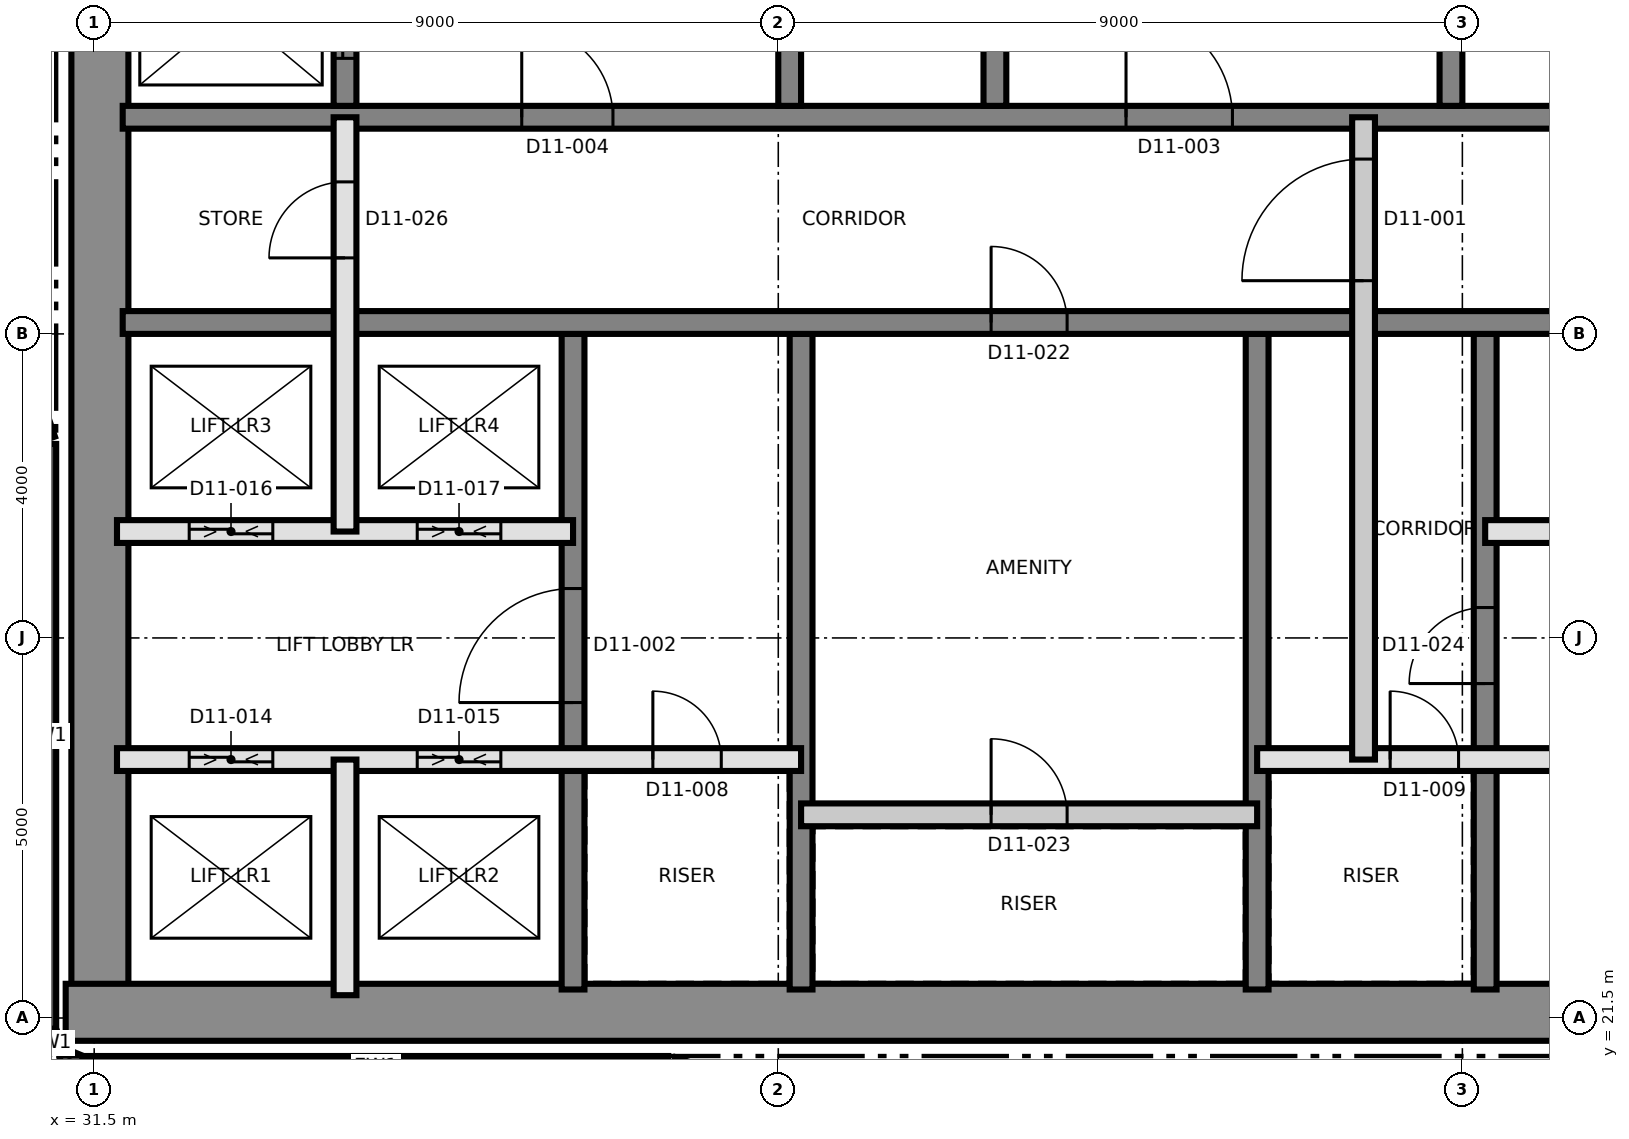
"""IFC4 building model, lengths in metres.
Left out: names, types, materials, properties, quantities, classifications, styles, units other than length and angle.
Written with IfcOpenShell. Run it as: python <this file> out.ifc"""

import sys

from ifc_helpers import new_model, si_unit, direction, frame, frame_2d, origin, place, context, subcontext, project, spatial, rectangle, extrude, element, fill, save


model = new_model("IFC4")
c1 = context("Model", 3, precision=1e-05, world=origin(), true_north=direction((0.0, 1.0)))
c2 = subcontext(c1, "Body", "Model", "MODEL_VIEW")
j1 = project(units=[si_unit("LENGTHUNIT", "METRE"), si_unit("PLANEANGLEUNIT", "RADIAN")], contexts=[c1])
p1 = place(None, origin())
s1 = spatial("IfcSite", under=j1, at=p1, CompositionType="ELEMENT")
p2 = place(p1, origin())
s2 = spatial("IfcBuilding", under=s1, at=p2, CompositionType="ELEMENT")
p3 = place(p2, frame((0.0, 0.0, 131.5)))
s3 = spatial("IfcBuildingStorey", under=s2, at=p3, CompositionType="ELEMENT", Elevation=131.5)
p4 = place(p3, frame((31.575, 21.875, 0.0), z_axis=(0.0, 0.0, 1.0), x_axis=(0.0, 1.0, 0.0)))
e1 = element("IfcWall", 1, at=p4, inside=s3, PredefinedType="SHEAR", context=c2, shape_type="SweptSolid", body=[
    extrude(rectangle(XDim=17.25, YDim=0.75, at=frame_2d((8.625, 0.0))), origin(), (0.0, 0.0, 1.0), 3.7),
])
p5 = place(p3, frame((31.125, 21.575, 0.0), z_axis=(0.0, 0.0, 1.0), x_axis=(1.0, 0.0, 0.0)))
e2 = element("IfcWall", 2, at=p5, inside=s3, PredefinedType="SHEAR", context=c2, shape_type="SweptSolid", body=[
    extrude(rectangle(XDim=27.0, YDim=0.75, at=frame_2d((13.5, 0.0))), origin(), (0.0, 0.0, 1.0), 3.7),
])
p6 = place(p3, frame((37.8, 21.875, 0.0), z_axis=(0.0, 0.0, 1.0), x_axis=(0.0, 1.0, 0.0)))
e3 = element("IfcWall", 3, at=p6, inside=s3, PredefinedType="SHEAR", context=c2, shape_type="SweptSolid", body=[
    extrude(rectangle(XDim=8.625, YDim=0.3, at=frame_2d((4.312, 0.0))), origin(), (0.0, 0.0, 1.0), 3.7),
])
p7 = place(p6, frame((3.775, 0.0, 0.0)))
e4 = element("IfcOpeningElement", 4, at=p7, cuts=e3, PredefinedType="OPENING", context=c2, shape_type="SweptSolid", body=[
    extrude(rectangle(XDim=1.5, YDim=2.1, at=frame_2d((0.75, 1.05))), frame((0.0, 0.16, 0.0), z_axis=(0.0, -1.0, 0.0), x_axis=(1.0, 0.0, 0.0)), (0.0, 0.0, 1.0), 0.32),
])
for number, where, z_axis, x_axis in (
    (5, (40.8, 21.875, 0.0), (0.0, 0.0, 1.0), (0.0, 1.0, 0.0)),
    (6, (46.8, 21.875, 0.0), (0.0, 0.0, 1.0), (0.0, 1.0, 0.0)),
):
    element("IfcWall", number, at=place(p3, frame(where, z_axis=z_axis, x_axis=x_axis)), inside=s3, PredefinedType="SHEAR", context=c2, shape_type="SweptSolid", body=[
        extrude(rectangle(XDim=8.625, YDim=0.3, at=frame_2d((4.312, 0.0))), origin(), (0.0, 0.0, 1.0), 3.7),
    ])
p8 = place(p3, frame((49.8, 21.875, 0.0), z_axis=(0.0, 0.0, 1.0), x_axis=(0.0, 1.0, 0.0)))
e7 = element("IfcWall", 7, at=p8, inside=s3, PredefinedType="SHEAR", context=c2, shape_type="SweptSolid", body=[
    extrude(rectangle(XDim=8.625, YDim=0.3, at=frame_2d((4.312, 0.0))), origin(), (0.0, 0.0, 1.0), 3.7),
])
p9 = place(p8, frame((4.025, 0.0, 0.0)))
e8 = element("IfcOpeningElement", 8, at=p9, cuts=e7, PredefinedType="OPENING", context=c2, shape_type="SweptSolid", body=[
    extrude(rectangle(XDim=1.0, YDim=2.1, at=frame_2d((0.5, 1.05))), frame((0.0, 0.16, 0.0), z_axis=(0.0, -1.0, 0.0), x_axis=(1.0, 0.0, 0.0)), (0.0, 0.0, 1.0), 0.32),
])
p10 = place(p3, frame((31.875, 30.65, 0.0), z_axis=(0.0, 0.0, 1.0), x_axis=(1.0, 0.0, 0.0)))
e9 = element("IfcWall", 9, at=p10, inside=s3, PredefinedType="SHEAR", context=c2, shape_type="SweptSolid", body=[
    extrude(rectangle(XDim=26.25, YDim=0.3, at=frame_2d((13.125, 0.0))), origin(), (0.0, 0.0, 1.0), 3.7),
])
p11 = place(p10, frame((24.625, 0.0, 0.0)))
e10 = element("IfcOpeningElement", 10, at=p11, cuts=e9, PredefinedType="OPENING", context=c2, shape_type="SweptSolid", body=[
    extrude(rectangle(XDim=1.0, YDim=2.1, at=frame_2d((0.5, 1.05))), frame((0.0, 0.16, 0.0), z_axis=(0.0, -1.0, 0.0), x_axis=(1.0, 0.0, 0.0)), (0.0, 0.0, 1.0), 0.32),
])
p12 = place(p10, frame((11.425, 0.0, 0.0)))
e11 = element("IfcOpeningElement", 11, at=p12, cuts=e9, PredefinedType="OPENING", context=c2, shape_type="SweptSolid", body=[
    extrude(rectangle(XDim=1.0, YDim=2.1, at=frame_2d((0.5, 1.05))), frame((0.0, 0.16, 0.0), z_axis=(0.0, -1.0, 0.0), x_axis=(1.0, 0.0, 0.0)), (0.0, 0.0, 1.0), 0.32),
])
p13 = place(p3, frame((31.875, 33.35, 0.0), z_axis=(0.0, 0.0, 1.0), x_axis=(1.0, 0.0, 0.0)))
e12 = element("IfcWall", 12, at=p13, inside=s3, PredefinedType="SHEAR", context=c2, shape_type="SweptSolid", body=[
    extrude(rectangle(XDim=26.25, YDim=0.3, at=frame_2d((13.125, 0.0))), origin(), (0.0, 0.0, 1.0), 3.7),
])
p14 = place(p13, frame((13.2, 0.0, 0.0)))
e13 = element("IfcOpeningElement", 13, at=p14, cuts=e12, PredefinedType="OPENING", context=c2, shape_type="SweptSolid", body=[
    extrude(rectangle(XDim=1.4, YDim=2.1, at=frame_2d((0.7, 1.05))), frame((0.0, 0.16, 0.0), z_axis=(0.0, -1.0, 0.0), x_axis=(1.0, 0.0, 0.0)), (0.0, 0.0, 1.0), 0.32),
])
p15 = place(p13, frame((5.25, 0.0, 0.0)))
e14 = element("IfcOpeningElement", 14, at=p15, cuts=e12, PredefinedType="OPENING", context=c2, shape_type="SweptSolid", body=[
    extrude(rectangle(XDim=1.2, YDim=2.1, at=frame_2d((0.6, 1.05))), frame((0.0, 0.16, 0.0), z_axis=(0.0, -1.0, 0.0), x_axis=(1.0, 0.0, 0.0)), (0.0, 0.0, 1.0), 0.32),
])
p16 = place(p13, frame((19.8, 0.0, 0.0)))
e15 = element("IfcOpeningElement", 15, at=p16, cuts=e12, PredefinedType="OPENING", context=c2, shape_type="SweptSolid", body=[
    extrude(rectangle(XDim=1.2, YDim=2.1, at=frame_2d((0.6, 1.05))), frame((0.0, 0.16, 0.0), z_axis=(0.0, -1.0, 0.0), x_axis=(1.0, 0.0, 0.0)), (0.0, 0.0, 1.0), 0.32),
])
for number, where, z_axis, x_axis in (
    (16, (40.65, 33.5, 0.0), (0.0, 0.0, 1.0), (0.0, 1.0, 0.0)),
    (17, (43.35, 33.5, 0.0), (0.0, 0.0, 1.0), (0.0, 1.0, 0.0)),
):
    element("IfcWall", number, at=place(p3, frame(where, z_axis=z_axis, x_axis=x_axis)), inside=s3, PredefinedType="SHEAR", context=c2, shape_type="SweptSolid", body=[
        extrude(rectangle(XDim=5.625, YDim=0.3, at=frame_2d((2.812, 0.0))), origin(), (0.0, 0.0, 1.0), 3.7),
    ])
p17 = place(p3, frame((34.8, 33.5, 0.0), z_axis=(0.0, 0.0, 1.0), x_axis=(0.0, 1.0, 0.0)))
e18 = element("IfcWall", 18, at=p17, inside=s3, PredefinedType="SHEAR", context=c2, shape_type="SweptSolid", body=[
    extrude(rectangle(XDim=2.55, YDim=0.3, at=frame_2d((1.275, 0.0))), origin(), (0.0, 0.0, 1.0), 3.7),
])
p18 = place(p17, frame((0.625, 0.0, 0.0)))
e19 = element("IfcOpeningElement", 19, at=p18, cuts=e18, PredefinedType="OPENING", context=c2, shape_type="SweptSolid", body=[
    extrude(rectangle(XDim=1.3, YDim=2.4, at=frame_2d((0.65, 1.2))), frame((0.0, 0.16, 0.0), z_axis=(0.0, -1.0, 0.0), x_axis=(1.0, 0.0, 0.0)), (0.0, 0.0, 1.0), 0.32),
])
p19 = place(p3, frame((49.35, 33.5, 0.0), z_axis=(0.0, 0.0, 1.0), x_axis=(0.0, 1.0, 0.0)))
e20 = element("IfcWall", 20, at=p19, inside=s3, PredefinedType="SHEAR", context=c2, shape_type="SweptSolid", body=[
    extrude(rectangle(XDim=5.625, YDim=0.3, at=frame_2d((2.812, 0.0))), origin(), (0.0, 0.0, 1.0), 3.7),
])
p20 = place(p3, frame((30.85, 29.052, 0.0), z_axis=(0.0, 0.0, 1.0), x_axis=(0.0, -1.0, 0.0)))
e21 = element("IfcWall", 21, at=p20, inside=s3, PredefinedType="SOLIDWALL", context=c2, shape_type="SweptSolid", body=[
    extrude(rectangle(XDim=7.693, YDim=0.3, at=frame_2d((3.846, 0.0))), origin(), (0.0, 0.0, 1.0), 3.4),
])
for number, where, z_axis, x_axis in (
    (22, (30.861, 21.302, 0.0), (0.0, 0.0, 1.0), (0.383, -0.924, 0.0)),
    (23, (31.048, 20.967, 0.0), (0.0, 0.0, 1.0), (0.924, -0.383, 0.0)),
):
    element("IfcWall", number, at=place(p3, frame(where, z_axis=z_axis, x_axis=x_axis)), inside=s3, PredefinedType="SOLIDWALL", context=c2, shape_type="SweptSolid", body=[
        extrude(rectangle(XDim=0.275, YDim=0.3, at=frame_2d((0.138, 0.0))), origin(), (0.0, 0.0, 1.0), 3.4),
    ])
p21 = place(p3, frame((31.36, 20.85, 0.0), z_axis=(0.0, 0.0, 1.0), x_axis=(1.0, 0.0, 0.0)))
e24 = element("IfcWall", 24, at=p21, inside=s3, PredefinedType="SOLIDWALL", context=c2, shape_type="SweptSolid", body=[
    extrude(rectangle(XDim=7.693, YDim=0.3, at=frame_2d((3.846, 0.0))), origin(), (0.0, 0.0, 1.0), 3.4),
])
for number, where, z_axis, x_axis in (
    (25, (39.101, 20.842, 0.0), (0.0, 0.0, 1.0), (0.947, -0.321, 0.0)),
    (26, (30.418, 30.351, 0.0), (0.0, 0.0, 1.0), (0.321, -0.947, 0.0)),
):
    element("IfcWall", number, at=place(p3, frame(where, z_axis=z_axis, x_axis=x_axis)), inside=s3, PredefinedType="SOLIDWALL", context=c2, shape_type="SweptSolid", body=[
        extrude(rectangle(XDim=1.32, YDim=0.3, at=frame_2d((0.66, 0.0))), origin(), (0.0, 0.0, 1.0), 3.4),
    ])
p22 = place(p3, frame((40.8, 24.173, 0.0), z_axis=(0.0, 0.0, 1.0), x_axis=(1.0, 0.0, 0.0)))
e27 = element("IfcWall", 27, at=p22, inside=s3, PredefinedType="PARTITIONING", context=c2, shape_type="SweptSolid", body=[
    extrude(rectangle(XDim=6.0, YDim=0.3, at=frame_2d((3.0, 0.0))), origin(), (0.0, 0.0, 1.0), 3.4),
])
p23 = place(p22, frame((2.5, 0.0, 0.0)))
e28 = element("IfcOpeningElement", 28, at=p23, cuts=e27, PredefinedType="OPENING", context=c2, shape_type="SweptSolid", body=[
    extrude(rectangle(XDim=1.0, YDim=2.1, at=frame_2d((0.5, 1.05))), frame((0.0, 0.16, 0.0), z_axis=(0.0, -1.0, 0.0), x_axis=(1.0, 0.0, 0.0)), (0.0, 0.0, 1.0), 0.32),
])
p24 = place(p3, frame((31.8, 24.9, 0.0), z_axis=(0.0, 0.0, 1.0), x_axis=(1.0, 0.0, 0.0)))
e29 = element("IfcWall", 29, at=p24, inside=s3, PredefinedType="SOLIDWALL", context=c2, shape_type="SweptSolid", body=[
    extrude(rectangle(XDim=9.0, YDim=0.3, at=frame_2d((4.5, 0.0))), origin(), (0.0, 0.0, 1.0), 3.4),
])
p25 = place(p24, frame((7.05, 0.0, 0.0)))
e30 = element("IfcOpeningElement", 30, at=p25, cuts=e29, PredefinedType="OPENING", context=c2, shape_type="SweptSolid", body=[
    extrude(rectangle(XDim=0.9, YDim=2.1, at=frame_2d((0.45, 1.05))), frame((0.0, 0.16, 0.0), z_axis=(0.0, -1.0, 0.0), x_axis=(1.0, 0.0, 0.0)), (0.0, 0.0, 1.0), 0.32),
])
p26 = place(p24, frame((0.95, 0.0, 0.0)))
e31 = element("IfcOpeningElement", 31, at=p26, cuts=e29, PredefinedType="OPENING", context=c2, shape_type="SweptSolid", body=[
    extrude(rectangle(XDim=1.1, YDim=2.4, at=frame_2d((0.55, 1.2))), frame((0.0, 0.16, 0.0), z_axis=(0.0, -1.0, 0.0), x_axis=(1.0, 0.0, 0.0)), (0.0, 0.0, 1.0), 0.32),
])
p27 = place(p24, frame((3.95, 0.0, 0.0)))
e32 = element("IfcOpeningElement", 32, at=p27, cuts=e29, PredefinedType="OPENING", context=c2, shape_type="SweptSolid", body=[
    extrude(rectangle(XDim=1.1, YDim=2.4, at=frame_2d((0.55, 1.2))), frame((0.0, 0.16, 0.0), z_axis=(0.0, -1.0, 0.0), x_axis=(1.0, 0.0, 0.0)), (0.0, 0.0, 1.0), 0.32),
])
p28 = place(p3, frame((46.8, 24.9, 0.0), z_axis=(0.0, 0.0, 1.0), x_axis=(1.0, 0.0, 0.0)))
e33 = element("IfcWall", 33, at=p28, inside=s3, PredefinedType="SOLIDWALL", context=c2, shape_type="SweptSolid", body=[
    extrude(rectangle(XDim=9.0, YDim=0.3, at=frame_2d((4.5, 0.0))), origin(), (0.0, 0.0, 1.0), 3.4),
])
p29 = place(p28, frame((1.75, 0.0, 0.0)))
e34 = element("IfcOpeningElement", 34, at=p29, cuts=e33, PredefinedType="OPENING", context=c2, shape_type="SweptSolid", body=[
    extrude(rectangle(XDim=0.9, YDim=2.1, at=frame_2d((0.45, 1.05))), frame((0.0, 0.16, 0.0), z_axis=(0.0, -1.0, 0.0), x_axis=(1.0, 0.0, 0.0)), (0.0, 0.0, 1.0), 0.32),
])
p30 = place(p3, frame((31.8, 27.9, 0.0), z_axis=(0.0, 0.0, 1.0), x_axis=(1.0, 0.0, 0.0)))
e35 = element("IfcWall", 35, at=p30, inside=s3, PredefinedType="SOLIDWALL", context=c2, shape_type="SweptSolid", body=[
    extrude(rectangle(XDim=6.0, YDim=0.3, at=frame_2d((3.0, 0.0))), origin(), (0.0, 0.0, 1.0), 3.4),
])
p31 = place(p30, frame((0.95, 0.0, 0.0)))
e36 = element("IfcOpeningElement", 36, at=p31, cuts=e35, PredefinedType="OPENING", context=c2, shape_type="SweptSolid", body=[
    extrude(rectangle(XDim=1.1, YDim=2.4, at=frame_2d((0.55, 1.2))), frame((0.0, 0.16, 0.0), z_axis=(0.0, -1.0, 0.0), x_axis=(1.0, 0.0, 0.0)), (0.0, 0.0, 1.0), 0.32),
])
p32 = place(p30, frame((3.95, 0.0, 0.0)))
e37 = element("IfcOpeningElement", 37, at=p32, cuts=e35, PredefinedType="OPENING", context=c2, shape_type="SweptSolid", body=[
    extrude(rectangle(XDim=1.1, YDim=2.4, at=frame_2d((0.55, 1.2))), frame((0.0, 0.16, 0.0), z_axis=(0.0, -1.0, 0.0), x_axis=(1.0, 0.0, 0.0)), (0.0, 0.0, 1.0), 0.32),
])
p33 = place(p3, frame((49.8, 27.9, 0.0), z_axis=(0.0, 0.0, 1.0), x_axis=(1.0, 0.0, 0.0)))
e38 = element("IfcWall", 38, at=p33, inside=s3, PredefinedType="SOLIDWALL", context=c2, shape_type="SweptSolid", body=[
    extrude(rectangle(XDim=6.0, YDim=0.3, at=frame_2d((3.0, 0.0))), origin(), (0.0, 0.0, 1.0), 3.4),
])
p34 = place(p3, frame((34.8, 21.8, 0.0), z_axis=(0.0, 0.0, 1.0), x_axis=(0.0, 1.0, 0.0)))
e39 = element("IfcWall", 39, at=p34, inside=s3, PredefinedType="SOLIDWALL", context=c2, shape_type="SweptSolid", body=[
    extrude(rectangle(XDim=3.1, YDim=0.3, at=frame_2d((1.55, 0.0))), origin(), (0.0, 0.0, 1.0), 3.4),
])
p35 = place(p3, frame((34.8, 27.9, 0.0), z_axis=(0.0, 0.0, 1.0), x_axis=(0.0, 1.0, 0.0)))
e40 = element("IfcWall", 40, at=p35, inside=s3, PredefinedType="SOLIDWALL", context=c2, shape_type="SweptSolid", body=[
    extrude(rectangle(XDim=5.45, YDim=0.3, at=frame_2d((2.725, 0.0))), origin(), (0.0, 0.0, 1.0), 3.4),
])
p36 = place(p35, frame((3.6, 0.0, 0.0)))
e41 = element("IfcOpeningElement", 41, at=p36, cuts=e40, PredefinedType="OPENING", context=c2, shape_type="SweptSolid", body=[
    extrude(rectangle(XDim=1.0, YDim=2.1, at=frame_2d((0.5, 1.05))), frame((0.0, 0.16, 0.0), z_axis=(0.0, -1.0, 0.0), x_axis=(1.0, 0.0, 0.0)), (0.0, 0.0, 1.0), 0.32),
])
p37 = place(p3, frame((48.2, 24.9, 0.0), z_axis=(0.0, 0.0, 1.0), x_axis=(0.0, 1.0, 0.0)))
e42 = element("IfcWall", 42, at=p37, inside=s3, PredefinedType="PARTITIONING", context=c2, shape_type="SweptSolid", body=[
    extrude(rectangle(XDim=8.45, YDim=0.3, at=frame_2d((4.225, 0.0))), origin(), (0.0, 0.0, 1.0), 3.4),
])
p38 = place(p37, frame((6.3, 0.0, 0.0)))
e43 = element("IfcOpeningElement", 43, at=p38, cuts=e42, PredefinedType="OPENING", context=c2, shape_type="SweptSolid", body=[
    extrude(rectangle(XDim=1.6, YDim=2.1, at=frame_2d((0.8, 1.05))), frame((0.0, 0.16, 0.0), z_axis=(0.0, -1.0, 0.0), x_axis=(1.0, 0.0, 0.0)), (0.0, 0.0, 1.0), 0.32),
])
p39 = place(p38, origin())
e44 = element("IfcDoor", 44, at=p39, inside=s3, OperationType="SINGLE_SWING_LEFT", PredefinedType="DOOR", context=c2, shape_type="SweptSolid", body=[
    extrude(rectangle(XDim=1.6, YDim=2.1, at=frame_2d((0.8, 1.05))), frame((0.0, 0.025, 0.0), z_axis=(0.0, -1.0, 0.0), x_axis=(1.0, 0.0, 0.0)), (0.0, 0.0, 1.0), 0.05),
])
fill(e43, e44)
p40 = place(p7, origin())
e45 = element("IfcDoor", 45, at=p40, inside=s3, OperationType="SINGLE_SWING_LEFT", PredefinedType="DOOR", context=c2, shape_type="SweptSolid", body=[
    extrude(rectangle(XDim=1.5, YDim=2.1, at=frame_2d((0.75, 1.05))), frame((0.0, 0.025, 0.0), z_axis=(0.0, -1.0, 0.0), x_axis=(1.0, 0.0, 0.0)), (0.0, 0.0, 1.0), 0.05),
])
fill(e4, e45)
p41 = place(p14, origin())
e46 = element("IfcDoor", 46, at=p41, inside=s3, OperationType="SINGLE_SWING_RIGHT", PredefinedType="DOOR", context=c2, shape_type="SweptSolid", body=[
    extrude(rectangle(XDim=1.4, YDim=2.1, at=frame_2d((0.7, 1.05))), frame((0.0, 0.025, 0.0), z_axis=(0.0, -1.0, 0.0), x_axis=(1.0, 0.0, 0.0)), (0.0, 0.0, 1.0), 0.05),
])
fill(e13, e46)
p42 = place(p15, origin())
e47 = element("IfcDoor", 47, at=p42, inside=s3, OperationType="SINGLE_SWING_LEFT", PredefinedType="DOOR", context=c2, shape_type="SweptSolid", body=[
    extrude(rectangle(XDim=1.2, YDim=2.1, at=frame_2d((0.6, 1.05))), frame((0.0, 0.025, 0.0), z_axis=(0.0, -1.0, 0.0), x_axis=(1.0, 0.0, 0.0)), (0.0, 0.0, 1.0), 0.05),
])
fill(e14, e47)
p43 = place(p25, origin())
e48 = element("IfcDoor", 48, at=p43, inside=s3, OperationType="SINGLE_SWING_LEFT", PredefinedType="DOOR", context=c2, shape_type="SweptSolid", body=[
    extrude(rectangle(XDim=0.9, YDim=2.1, at=frame_2d((0.45, 1.05))), frame((0.0, 0.025, 0.0), z_axis=(0.0, -1.0, 0.0), x_axis=(1.0, 0.0, 0.0)), (0.0, 0.0, 1.0), 0.05),
])
fill(e30, e48)
p44 = place(p29, origin())
e49 = element("IfcDoor", 49, at=p44, inside=s3, OperationType="SINGLE_SWING_RIGHT", PredefinedType="DOOR", context=c2, shape_type="SweptSolid", body=[
    extrude(rectangle(XDim=0.9, YDim=2.1, at=frame_2d((0.45, 1.05))), frame((0.0, 0.025, 0.0), z_axis=(0.0, -1.0, 0.0), x_axis=(1.0, 0.0, 0.0)), (0.0, 0.0, 1.0), 0.05),
])
fill(e34, e49)
p45 = place(p26, origin())
e50 = element("IfcDoor", 50, at=p45, inside=s3, OperationType="SLIDING_TO_LEFT", PredefinedType="DOOR", context=c2, shape_type="SweptSolid", body=[
    extrude(rectangle(XDim=1.1, YDim=2.4, at=frame_2d((0.55, 1.2))), frame((0.0, 0.025, 0.0), z_axis=(0.0, -1.0, 0.0), x_axis=(1.0, 0.0, 0.0)), (0.0, 0.0, 1.0), 0.05),
])
fill(e31, e50)
p46 = place(p27, origin())
e51 = element("IfcDoor", 51, at=p46, inside=s3, OperationType="SLIDING_TO_LEFT", PredefinedType="DOOR", context=c2, shape_type="SweptSolid", body=[
    extrude(rectangle(XDim=1.1, YDim=2.4, at=frame_2d((0.55, 1.2))), frame((0.0, 0.025, 0.0), z_axis=(0.0, -1.0, 0.0), x_axis=(1.0, 0.0, 0.0)), (0.0, 0.0, 1.0), 0.05),
])
fill(e32, e51)
p47 = place(p31, origin())
e52 = element("IfcDoor", 52, at=p47, inside=s3, OperationType="SLIDING_TO_LEFT", PredefinedType="DOOR", context=c2, shape_type="SweptSolid", body=[
    extrude(rectangle(XDim=1.1, YDim=2.4, at=frame_2d((0.55, 1.2))), frame((0.0, 0.025, 0.0), z_axis=(0.0, -1.0, 0.0), x_axis=(1.0, 0.0, 0.0)), (0.0, 0.0, 1.0), 0.05),
])
fill(e36, e52)
p48 = place(p32, origin())
e53 = element("IfcDoor", 53, at=p48, inside=s3, OperationType="SLIDING_TO_LEFT", PredefinedType="DOOR", context=c2, shape_type="SweptSolid", body=[
    extrude(rectangle(XDim=1.1, YDim=2.4, at=frame_2d((0.55, 1.2))), frame((0.0, 0.025, 0.0), z_axis=(0.0, -1.0, 0.0), x_axis=(1.0, 0.0, 0.0)), (0.0, 0.0, 1.0), 0.05),
])
fill(e37, e53)
p49 = place(p18, origin())
e54 = element("IfcDoor", 54, at=p49, inside=s3, OperationType="SLIDING_TO_LEFT", PredefinedType="DOOR", context=c2, shape_type="SweptSolid", body=[
    extrude(rectangle(XDim=1.3, YDim=2.4, at=frame_2d((0.65, 1.2))), frame((0.0, 0.025, 0.0), z_axis=(0.0, -1.0, 0.0), x_axis=(1.0, 0.0, 0.0)), (0.0, 0.0, 1.0), 0.05),
])
fill(e19, e54)
p50 = place(p12, origin())
e55 = element("IfcDoor", 55, at=p50, inside=s3, OperationType="SINGLE_SWING_LEFT", PredefinedType="DOOR", context=c2, shape_type="SweptSolid", body=[
    extrude(rectangle(XDim=1.0, YDim=2.1, at=frame_2d((0.5, 1.05))), frame((0.0, 0.025, 0.0), z_axis=(0.0, -1.0, 0.0), x_axis=(1.0, 0.0, 0.0)), (0.0, 0.0, 1.0), 0.05),
])
fill(e11, e55)
p51 = place(p23, origin())
e56 = element("IfcDoor", 56, at=p51, inside=s3, OperationType="SINGLE_SWING_RIGHT", PredefinedType="DOOR", context=c2, shape_type="SweptSolid", body=[
    extrude(rectangle(XDim=1.0, YDim=2.1, at=frame_2d((0.5, 1.05))), frame((0.0, 0.025, 0.0), z_axis=(0.0, -1.0, 0.0), x_axis=(1.0, 0.0, 0.0)), (0.0, 0.0, 1.0), 0.05),
])
fill(e28, e56)
p52 = place(p9, origin())
e57 = element("IfcDoor", 57, at=p52, inside=s3, OperationType="SINGLE_SWING_LEFT", PredefinedType="DOOR", context=c2, shape_type="SweptSolid", body=[
    extrude(rectangle(XDim=1.0, YDim=2.1, at=frame_2d((0.5, 1.05))), frame((0.0, 0.025, 0.0), z_axis=(0.0, -1.0, 0.0), x_axis=(1.0, 0.0, 0.0)), (0.0, 0.0, 1.0), 0.05),
])
fill(e8, e57)
p53 = place(p36, origin())
e58 = element("IfcDoor", 58, at=p53, inside=s3, OperationType="SINGLE_SWING_LEFT", PredefinedType="DOOR", context=c2, shape_type="SweptSolid", body=[
    extrude(rectangle(XDim=1.0, YDim=2.1, at=frame_2d((0.5, 1.05))), frame((0.0, 0.025, 0.0), z_axis=(0.0, -1.0, 0.0), x_axis=(1.0, 0.0, 0.0)), (0.0, 0.0, 1.0), 0.05),
])
fill(e41, e58)
save(model, sys.argv[1])
